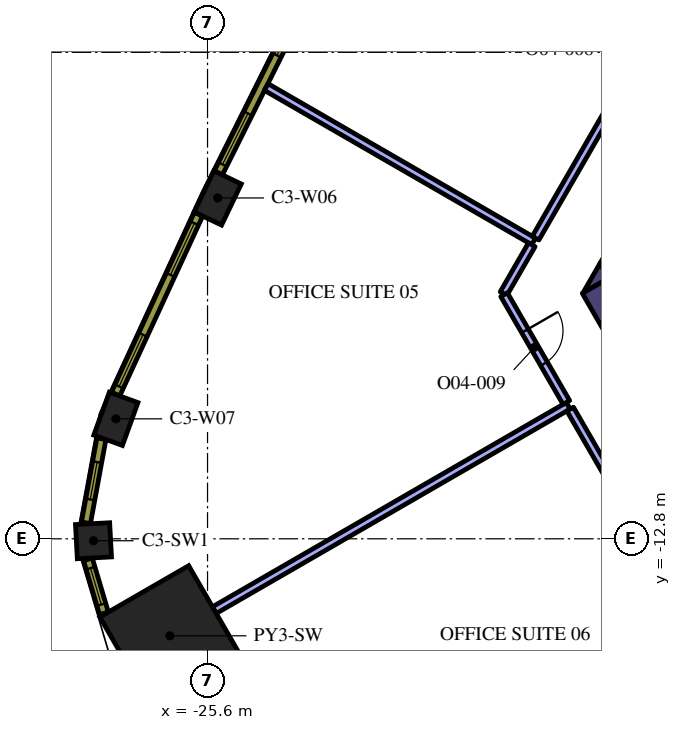
"""IFC4 building model, lengths in metres.
Left out: names, types, materials, properties, quantities, classifications, styles, units other than length and angle.
Written with IfcOpenShell. Run it as: python <this file> out.ifc"""

import sys

from ifc_helpers import new_model, si_unit, direction, frame, frame_2d, origin, origin_2d, place, context, subcontext, project, spatial, polyline, rectangle, outline, extrude, element, fill, save


model = new_model("IFC4")
c1 = context("Model", 3, precision=1e-05, world=origin(), true_north=direction((0.0, 1.0)))
c2 = subcontext(c1, "Body", "Model", "MODEL_VIEW")
j1 = project(units=[si_unit("LENGTHUNIT", "METRE"), si_unit("PLANEANGLEUNIT", "RADIAN")], contexts=[c1])
p1 = place(None, origin())
s1 = spatial("IfcSite", under=j1, at=p1, CompositionType="ELEMENT")
p2 = place(p1, origin())
s2 = spatial("IfcBuilding", under=s1, at=p2, CompositionType="ELEMENT")
p3 = place(p2, frame((0.0, 0.0, 183.6)))
s3 = spatial("IfcBuildingStorey", under=s2, at=p3, CompositionType="ELEMENT", Elevation=183.6)
p4 = place(p3, frame((-26.591, -15.352, 0.0), z_axis=(0.0, 0.0, 1.0), x_axis=(-0.866025403784, -0.5, 0.0)))
e1 = element("IfcColumn", 1, at=p4, inside=s3, PredefinedType="COLUMN", context=c2, shape_type="SweptSolid", body=[
    extrude(rectangle(XDim=2.7, YDim=2.7, at=origin_2d()), origin(), (0.0, 0.0, 1.0), 4.2),
])
for number, where, z_axis, x_axis in (
    (2, (-25.332, -3.832, 0.0), (0.0, 0.0, 1.0), (-0.433, -0.902, 0.0)),
    (3, (-28.012, -9.644, 0.0), (0.0, 0.0, 1.0), (-0.341, -0.94, 0.0)),
):
    element("IfcColumn", number, at=place(p3, frame(where, z_axis=z_axis, x_axis=x_axis)), inside=s3, PredefinedType="COLUMN", context=c2, shape_type="SweptSolid", body=[
        extrude(rectangle(XDim=1.2, YDim=0.8, at=origin_2d()), origin(), (0.0, 0.0, 1.0), 4.2),
    ])
p5 = place(p3, frame((-28.601, -12.851, 0.0), z_axis=(0.0, 0.0, 1.0), x_axis=(0.0533921468, -0.998573622053, 0.0)))
e4 = element("IfcColumn", 4, at=p5, inside=s3, PredefinedType="COLUMN", context=c2, shape_type="SweptSolid", body=[
    extrude(rectangle(XDim=0.9, YDim=0.9, at=origin_2d()), origin(), (0.0, 0.0, 1.0), 4.2),
])
p6 = place(p3, frame((-15.392, -6.14, 0.0), z_axis=(0.0, 0.0, 1.0), x_axis=(0.499984020225, -0.866034629516, 0.0)))
e5 = element("IfcWall", 5, at=p6, inside=s3, PredefinedType="SOLIDWALL", context=c2, shape_type="SweptSolid", body=[
    extrude(rectangle(XDim=3.824, YDim=0.8, at=frame_2d((1.912, 0.0))), origin(), (0.0, 0.0, 1.0), 4.2),
])
p7 = place(p3, origin())
e6 = element("IfcWall", 6, at=p7, inside=s3, PredefinedType="SOLIDWALL", context=c2, shape_type="SweptSolid", body=[
    extrude(outline(polyline([(-15.047, -5.938), (-15.719, -6.326), (-15.271, -5.55), (-15.047, -5.938)])), origin(), (0.0, 0.0, 1.0), 4.2),
])
p8 = place(p3, frame((-13.518, -3.314, 0.0), z_axis=(0.0, 0.0, 1.0), x_axis=(-0.499969377405, -0.866043083026, 0.0)))
e7 = element("IfcWall", 7, at=p8, inside=s3, PredefinedType="SOLIDWALL", context=c2, shape_type="SweptSolid", body=[
    extrude(rectangle(XDim=2.824, YDim=0.8, at=frame_2d((1.412, 0.0))), origin(), (0.0, 0.0, 1.0), 4.2),
])
e8 = element("IfcWall", 8, at=p7, inside=s3, PredefinedType="SOLIDWALL", context=c2, shape_type="SweptSolid", body=[
    extrude(outline(polyline([(-14.809, -6.35), (-15.257, -5.574), (-14.585, -5.962), (-14.809, -6.35)])), origin(), (0.0, 0.0, 1.0), 4.2),
])
p9 = place(p3, frame((-17.018, -4.976, 0.0), z_axis=(0.0, 0.0, 1.0), x_axis=(-0.866034495264, 0.499984252764, 0.0)))
e9 = element("IfcWall", 9, at=p9, inside=s3, PredefinedType="PARTITIONING", context=c2, shape_type="SweptSolid", body=[
    extrude(rectangle(XDim=8.126, YDim=0.2, at=frame_2d((4.063, 0.0))), origin(), (0.0, 0.0, 1.0), 3.15),
])
p10 = place(p3, frame((-12.374, 3.068, 0.0), z_axis=(0.0, 0.0, 1.0), x_axis=(-0.50000000053, -0.866025403479, 0.0)))
e10 = element("IfcWall", 10, at=p10, inside=s3, PredefinedType="PARTITIONING", context=c2, shape_type="SweptSolid", body=[
    extrude(rectangle(XDim=9.188, YDim=0.2, at=frame_2d((4.594, 0.0))), origin(), (0.0, 0.0, 1.0), 3.15),
])
p11 = place(p10, frame((4.1, 0.0, 0.0)))
e11 = element("IfcOpeningElement", 11, at=p11, cuts=e10, PredefinedType="OPENING", context=c2, shape_type="SweptSolid", body=[
    extrude(rectangle(XDim=1.0, YDim=2.1, at=frame_2d((0.5, 1.05))), frame((0.0, 0.11, 0.0), z_axis=(0.0, -1.0, 0.0), x_axis=(1.0, 0.0, 0.0)), (0.0, 0.0, 1.0), 0.22),
])
p12 = place(p3, frame((-16.108, -9.3, 0.0), z_axis=(0.0, 0.0, 1.0), x_axis=(-0.866027180319, -0.499996922939, 0.0)))
e12 = element("IfcWall", 12, at=p12, inside=s3, PredefinedType="PARTITIONING", context=c2, shape_type="SweptSolid", body=[
    extrude(rectangle(XDim=10.754, YDim=0.2, at=frame_2d((5.377, 0.0))), origin(), (0.0, 0.0, 1.0), 3.15),
])
p13 = place(p3, frame((-17.068, -5.062, 0.0), z_axis=(0.0, 0.0, 1.0), x_axis=(-0.499935638681, -0.86606255962, 0.0)))
e13 = element("IfcWall", 13, at=p13, inside=s3, PredefinedType="PARTITIONING", context=c2, shape_type="SweptSolid", body=[
    extrude(rectangle(XDim=1.487, YDim=0.2, at=frame_2d((0.744, 0.0))), origin(), (0.0, 0.0, 1.0), 3.15),
])
p14 = place(p3, frame((-17.796, -6.376, 0.0), z_axis=(0.0, 0.0, 1.0), x_axis=(0.500001965626, -0.866024268927, 0.0)))
e14 = element("IfcWall", 14, at=p14, inside=s3, PredefinedType="PARTITIONING", context=c2, shape_type="SweptSolid", body=[
    extrude(rectangle(XDim=3.276, YDim=0.2, at=frame_2d((1.638, 0.0))), origin(), (0.0, 0.0, 1.0), 3.15),
])
p15 = place(p14, frame((1.1, 0.0, 0.0)))
e15 = element("IfcOpeningElement", 15, at=p15, cuts=e14, PredefinedType="OPENING", context=c2, shape_type="SweptSolid", body=[
    extrude(rectangle(XDim=1.0, YDim=2.1, at=frame_2d((0.5, 1.05))), frame((0.0, 0.11, 0.0), z_axis=(0.0, -1.0, 0.0), x_axis=(1.0, 0.0, 0.0)), (0.0, 0.0, 1.0), 0.22),
])
p16 = place(p3, frame((-16.058, -9.387, 0.0), z_axis=(0.0, 0.0, 1.0), x_axis=(0.500046299512, -0.865998671098, 0.0)))
e16 = element("IfcWall", 16, at=p16, inside=s3, PredefinedType="PARTITIONING", context=c2, shape_type="SweptSolid", body=[
    extrude(rectangle(XDim=3.306, YDim=0.2, at=frame_2d((1.653, 0.0))), origin(), (0.0, 0.0, 1.0), 3.15),
])
p17 = place(p3, frame((-22.994, 1.485, 0.0), z_axis=(0.0, 0.0, 1.0), x_axis=(-0.446256171312, -0.8949052629, 0.0)))
e17 = element("IfcWall", 17, at=p17, inside=s3, PredefinedType="SOLIDWALL", context=c2, shape_type="SweptSolid", body=[
    extrude(rectangle(XDim=5.203, YDim=0.24, at=frame_2d((2.602, 0.0))), origin(), (0.0, 0.0, 1.0), 3.95),
])
p18 = place(p17, frame((0.248, 0.0, 0.9)))
e18 = element("IfcOpeningElement", 18, at=p18, cuts=e17, PredefinedType="OPENING", context=c2, shape_type="SweptSolid", body=[
    extrude(rectangle(XDim=1.5, YDim=2.55, at=frame_2d((0.75, 1.275))), frame((0.0, 0.13, 0.0), z_axis=(0.0, -1.0, 0.0), x_axis=(1.0, 0.0, 0.0)), (0.0, 0.0, 1.0), 0.26),
])
p19 = place(p17, frame((3.455, 0.0, 0.9)))
e19 = element("IfcOpeningElement", 19, at=p19, cuts=e17, PredefinedType="OPENING", context=c2, shape_type="SweptSolid", body=[
    extrude(rectangle(XDim=1.5, YDim=2.55, at=frame_2d((0.75, 1.275))), frame((0.0, 0.13, 0.0), z_axis=(0.0, -1.0, 0.0), x_axis=(1.0, 0.0, 0.0)), (0.0, 0.0, 1.0), 0.26),
])
p20 = place(p3, frame((-25.837, -4.258, 0.0), z_axis=(0.0, 0.0, 1.0), x_axis=(-0.418722559465, -0.908114209885, 0.0)))
e20 = element("IfcWall", 20, at=p20, inside=s3, PredefinedType="SOLIDWALL", context=c2, shape_type="SweptSolid", body=[
    extrude(rectangle(XDim=5.213, YDim=0.24, at=frame_2d((2.606, 0.0))), origin(), (0.0, 0.0, 1.0), 3.95),
])
p21 = place(p20, frame((0.261, 0.0, 0.9)))
e21 = element("IfcOpeningElement", 21, at=p21, cuts=e20, PredefinedType="OPENING", context=c2, shape_type="SweptSolid", body=[
    extrude(rectangle(XDim=1.5, YDim=2.55, at=frame_2d((0.75, 1.275))), frame((0.0, 0.13, 0.0), z_axis=(0.0, -1.0, 0.0), x_axis=(1.0, 0.0, 0.0)), (0.0, 0.0, 1.0), 0.26),
])
p22 = place(p20, frame((3.492, 0.0, 0.9)))
e22 = element("IfcOpeningElement", 22, at=p22, cuts=e20, PredefinedType="OPENING", context=c2, shape_type="SweptSolid", body=[
    extrude(rectangle(XDim=1.5, YDim=2.55, at=frame_2d((0.75, 1.275))), frame((0.0, 0.13, 0.0), z_axis=(0.0, -1.0, 0.0), x_axis=(1.0, 0.0, 0.0)), (0.0, 0.0, 1.0), 0.26),
])
p23 = place(p3, frame((-28.393, -10.167, 0.0), z_axis=(0.0, 0.0, 1.0), x_axis=(-0.180737189259, -0.983531427265, 0.0)))
e23 = element("IfcWall", 23, at=p23, inside=s3, PredefinedType="SOLIDWALL", context=c2, shape_type="SweptSolid", body=[
    extrude(rectangle(XDim=2.25, YDim=0.24, at=frame_2d((1.125, 0.0))), origin(), (0.0, 0.0, 1.0), 3.95),
])
p24 = place(p23, frame((0.625, 0.0, 0.9)))
e24 = element("IfcOpeningElement", 24, at=p24, cuts=e23, PredefinedType="OPENING", context=c2, shape_type="SweptSolid", body=[
    extrude(rectangle(XDim=1.0, YDim=2.55, at=frame_2d((0.5, 1.275))), frame((0.0, 0.13, 0.0), z_axis=(0.0, -1.0, 0.0), x_axis=(1.0, 0.0, 0.0)), (0.0, 0.0, 1.0), 0.26),
])
p25 = place(p3, frame((-28.748, -13.34, 0.0), z_axis=(0.0, 0.0, 1.0), x_axis=(0.284413721403, -0.958701640281, 0.0)))
e25 = element("IfcWall", 25, at=p25, inside=s3, PredefinedType="SOLIDWALL", context=c2, shape_type="SweptSolid", body=[
    extrude(rectangle(XDim=1.482, YDim=0.24, at=frame_2d((0.741, 0.0))), origin(), (0.0, 0.0, 1.0), 3.95),
])
p26 = place(p25, frame((0.241, 0.0, 0.9)))
e26 = element("IfcOpeningElement", 26, at=p26, cuts=e25, PredefinedType="OPENING", context=c2, shape_type="SweptSolid", body=[
    extrude(rectangle(XDim=1.0, YDim=2.55, at=frame_2d((0.5, 1.275))), frame((0.0, 0.13, 0.0), z_axis=(0.0, -1.0, 0.0), x_axis=(1.0, 0.0, 0.0)), (0.0, 0.0, 1.0), 0.26),
])
p27 = place(p15, origin())
e27 = element("IfcDoor", 27, at=p27, inside=s3, OperationType="SINGLE_SWING_LEFT", PredefinedType="DOOR", context=c2, shape_type="SweptSolid", body=[
    extrude(rectangle(XDim=1.0, YDim=2.1, at=frame_2d((0.5, 1.05))), frame((0.0, 0.025, 0.0), z_axis=(0.0, -1.0, 0.0), x_axis=(1.0, 0.0, 0.0)), (0.0, 0.0, 1.0), 0.05),
])
fill(e15, e27)
p28 = place(p18, origin())
e28 = element("IfcWindow", 28, at=p28, inside=s3, PartitioningType="SINGLE_PANEL", PredefinedType="WINDOW", context=c2, shape_type="SweptSolid", body=[
    extrude(rectangle(XDim=1.5, YDim=2.55, at=frame_2d((0.75, 1.275))), frame((0.0, 0.04, 0.0), z_axis=(0.0, -1.0, 0.0), x_axis=(1.0, 0.0, 0.0)), (0.0, 0.0, 1.0), 0.06),
])
fill(e18, e28)
p29 = place(p19, origin())
e29 = element("IfcWindow", 29, at=p29, inside=s3, PartitioningType="SINGLE_PANEL", PredefinedType="WINDOW", context=c2, shape_type="SweptSolid", body=[
    extrude(rectangle(XDim=1.5, YDim=2.55, at=frame_2d((0.75, 1.275))), frame((0.0, 0.04, 0.0), z_axis=(0.0, -1.0, 0.0), x_axis=(1.0, 0.0, 0.0)), (0.0, 0.0, 1.0), 0.06),
])
fill(e19, e29)
p30 = place(p21, origin())
e30 = element("IfcWindow", 30, at=p30, inside=s3, PartitioningType="SINGLE_PANEL", PredefinedType="WINDOW", context=c2, shape_type="SweptSolid", body=[
    extrude(rectangle(XDim=1.5, YDim=2.55, at=frame_2d((0.75, 1.275))), frame((0.0, 0.04, 0.0), z_axis=(0.0, -1.0, 0.0), x_axis=(1.0, 0.0, 0.0)), (0.0, 0.0, 1.0), 0.06),
])
fill(e21, e30)
p31 = place(p22, origin())
e31 = element("IfcWindow", 31, at=p31, inside=s3, PartitioningType="SINGLE_PANEL", PredefinedType="WINDOW", context=c2, shape_type="SweptSolid", body=[
    extrude(rectangle(XDim=1.5, YDim=2.55, at=frame_2d((0.75, 1.275))), frame((0.0, 0.04, 0.0), z_axis=(0.0, -1.0, 0.0), x_axis=(1.0, 0.0, 0.0)), (0.0, 0.0, 1.0), 0.06),
])
fill(e22, e31)
p32 = place(p24, origin())
e32 = element("IfcWindow", 32, at=p32, inside=s3, PartitioningType="SINGLE_PANEL", PredefinedType="WINDOW", context=c2, shape_type="SweptSolid", body=[
    extrude(rectangle(XDim=1.0, YDim=2.55, at=frame_2d((0.5, 1.275))), frame((0.0, 0.04, 0.0), z_axis=(0.0, -1.0, 0.0), x_axis=(1.0, 0.0, 0.0)), (0.0, 0.0, 1.0), 0.06),
])
fill(e24, e32)
p33 = place(p26, origin())
e33 = element("IfcWindow", 33, at=p33, inside=s3, PartitioningType="SINGLE_PANEL", PredefinedType="WINDOW", context=c2, shape_type="SweptSolid", body=[
    extrude(rectangle(XDim=1.0, YDim=2.55, at=frame_2d((0.5, 1.275))), frame((0.0, 0.04, 0.0), z_axis=(0.0, -1.0, 0.0), x_axis=(1.0, 0.0, 0.0)), (0.0, 0.0, 1.0), 0.06),
])
fill(e26, e33)
save(model, sys.argv[1])
